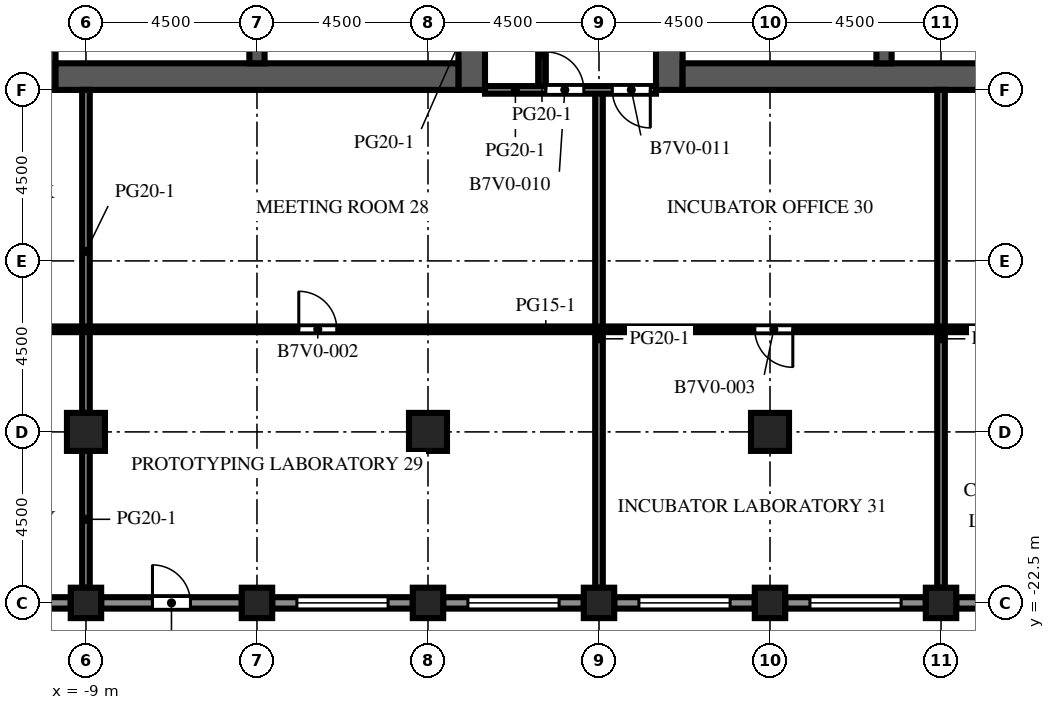
"""IFC4 building model, lengths in metres.
Left out: names, types, materials, properties, quantities, classifications, styles, units other than length and angle.
Written with IfcOpenShell. Run it as: python <this file> out.ifc"""

import sys

from ifc_helpers import new_model, si_unit, direction, frame, frame_2d, origin, origin_2d, place, context, subcontext, project, spatial, rectangle, extrude, element, fill, save


model = new_model("IFC4")
c1 = context("Model", 3, precision=1e-05, world=origin(), true_north=direction((0.0, 1.0)))
c2 = subcontext(c1, "Body", "Model", "MODEL_VIEW")
j1 = project(units=[si_unit("LENGTHUNIT", "METRE"), si_unit("PLANEANGLEUNIT", "RADIAN")], contexts=[c1])
p1 = place(None, origin())
s1 = spatial("IfcSite", under=j1, at=p1, CompositionType="ELEMENT")
p2 = place(p1, origin())
s2 = spatial("IfcBuilding", under=s1, at=p2, CompositionType="ELEMENT")
p3 = place(p2, frame((0.0, 0.0, 239.8)))
s3 = spatial("IfcBuildingStorey", under=s2, at=p3, CompositionType="ELEMENT", Elevation=239.8)
for number, where, z_axis, x_axis in (
    (1, (-9.0, -22.5, 0.0), (0.0, 0.0, 1.0), (1.0, 0.0, 0.0)),
    (2, (-4.5, -22.5, 0.0), (0.0, 0.0, 1.0), (1.0, 0.0, 0.0)),
    (3, (0.0, -22.5, 0.0), (0.0, 0.0, 1.0), (1.0, 0.0, 0.0)),
    (4, (4.5, -22.5, 0.0), (0.0, 0.0, 1.0), (1.0, 0.0, 0.0)),
    (5, (9.0, -22.5, 0.0), (0.0, 0.0, 1.0), (1.0, 0.0, 0.0)),
    (6, (13.5, -22.5, 0.0), (0.0, 0.0, 1.0), (1.0, 0.0, 0.0)),
):
    element("IfcColumn", number, at=place(p3, frame(where, z_axis=z_axis, x_axis=x_axis)), inside=s3, PredefinedType="COLUMN", context=c2, shape_type="SweptSolid", body=[
        extrude(rectangle(XDim=0.8, YDim=0.8, at=origin_2d()), origin(), (0.0, 0.0, 1.0), 4.1),
    ])
for number, where, z_axis, x_axis in (
    (7, (-9.0, -18.0, 0.0), (0.0, 0.0, 1.0), (1.0, 0.0, 0.0)),
    (8, (0.0, -18.0, 0.0), (0.0, 0.0, 1.0), (1.0, 0.0, 0.0)),
    (9, (9.0, -18.0, 0.0), (0.0, 0.0, 1.0), (1.0, 0.0, 0.0)),
):
    element("IfcColumn", number, at=place(p3, frame(where, z_axis=z_axis, x_axis=x_axis)), inside=s3, PredefinedType="COLUMN", context=c2, shape_type="SweptSolid", body=[
        extrude(rectangle(XDim=1.0, YDim=1.0, at=origin_2d()), origin(), (0.0, 0.0, 1.0), 4.1),
    ])
p4 = place(p3, frame((-10.15, -9.0, 0.0), z_axis=(0.0, 0.0, 1.0), x_axis=(0.0, 1.0, 0.0)))
e10 = element("IfcWall", 10, at=p4, inside=s3, PredefinedType="SHEAR", context=c2, shape_type="SweptSolid", body=[
    extrude(rectangle(XDim=27.5, YDim=0.7, at=frame_2d((13.75, 0.0))), origin(), (0.0, 0.0, 1.0), 4.1),
])
p5 = place(p4, frame((12.55, 0.0, 0.0)))
e11 = element("IfcOpeningElement", 11, at=p5, cuts=e10, PredefinedType="OPENING", context=c2, shape_type="SweptSolid", body=[
    extrude(rectangle(XDim=2.4, YDim=2.4, at=frame_2d((1.2, 1.2))), frame((0.0, 0.36, 0.0), z_axis=(0.0, -1.0, 0.0), x_axis=(1.0, 0.0, 0.0)), (0.0, 0.0, 1.0), 0.72),
])
p6 = place(p4, frame((6.825, 0.0, 0.0)))
e12 = element("IfcOpeningElement", 12, at=p6, cuts=e10, PredefinedType="OPENING", context=c2, shape_type="SweptSolid", body=[
    extrude(rectangle(XDim=1.2, YDim=2.1, at=frame_2d((0.6, 1.05))), frame((0.0, 0.36, 0.0), z_axis=(0.0, -1.0, 0.0), x_axis=(1.0, 0.0, 0.0)), (0.0, 0.0, 1.0), 0.72),
])
p7 = place(p4, frame((19.475, 0.0, 0.0)))
e13 = element("IfcOpeningElement", 13, at=p7, cuts=e10, PredefinedType="OPENING", context=c2, shape_type="SweptSolid", body=[
    extrude(rectangle(XDim=1.2, YDim=2.1, at=frame_2d((0.6, 1.05))), frame((0.0, 0.36, 0.0), z_axis=(0.0, -1.0, 0.0), x_axis=(1.0, 0.0, 0.0)), (0.0, 0.0, 1.0), 0.72),
])
p8 = place(p3, frame((1.15, -9.0, 0.0), z_axis=(0.0, 0.0, 1.0), x_axis=(0.0, 1.0, 0.0)))
e14 = element("IfcWall", 14, at=p8, inside=s3, PredefinedType="SHEAR", context=c2, shape_type="SweptSolid", body=[
    extrude(rectangle(XDim=27.5, YDim=0.7, at=frame_2d((13.75, 0.0))), origin(), (0.0, 0.0, 1.0), 4.1),
])
p9 = place(p8, frame((12.55, 0.0, 0.0)))
e15 = element("IfcOpeningElement", 15, at=p9, cuts=e14, PredefinedType="OPENING", context=c2, shape_type="SweptSolid", body=[
    extrude(rectangle(XDim=2.4, YDim=2.4, at=frame_2d((1.2, 1.2))), frame((0.0, 0.36, 0.0), z_axis=(0.0, -1.0, 0.0), x_axis=(1.0, 0.0, 0.0)), (0.0, 0.0, 1.0), 0.72),
])
p10 = place(p8, frame((5.42, 0.0, 0.0)))
e16 = element("IfcOpeningElement", 16, at=p10, cuts=e14, PredefinedType="OPENING", context=c2, shape_type="SweptSolid", body=[
    extrude(rectangle(XDim=1.2, YDim=2.1, at=frame_2d((0.6, 1.05))), frame((0.0, 0.36, 0.0), z_axis=(0.0, -1.0, 0.0), x_axis=(1.0, 0.0, 0.0)), (0.0, 0.0, 1.0), 0.72),
])
p11 = place(p8, frame((19.46, 0.0, 0.0)))
e17 = element("IfcOpeningElement", 17, at=p11, cuts=e14, PredefinedType="OPENING", context=c2, shape_type="SweptSolid", body=[
    extrude(rectangle(XDim=1.0, YDim=2.1, at=frame_2d((0.5, 1.05))), frame((0.0, 0.36, 0.0), z_axis=(0.0, -1.0, 0.0), x_axis=(1.0, 0.0, 0.0)), (0.0, 0.0, 1.0), 0.72),
])
p12 = place(p8, frame((21.17, 0.0, 0.0)))
e18 = element("IfcOpeningElement", 18, at=p12, cuts=e14, PredefinedType="OPENING", context=c2, shape_type="SweptSolid", body=[
    extrude(rectangle(XDim=1.0, YDim=2.1, at=frame_2d((0.5, 1.05))), frame((0.0, 0.36, 0.0), z_axis=(0.0, -1.0, 0.0), x_axis=(1.0, 0.0, 0.0)), (0.0, 0.0, 1.0), 0.72),
])
p13 = place(p8, frame((23.26, 0.0, 0.0)))
e19 = element("IfcOpeningElement", 19, at=p13, cuts=e14, PredefinedType="OPENING", context=c2, shape_type="SweptSolid", body=[
    extrude(rectangle(XDim=1.0, YDim=2.1, at=frame_2d((0.5, 1.05))), frame((0.0, 0.36, 0.0), z_axis=(0.0, -1.0, 0.0), x_axis=(1.0, 0.0, 0.0)), (0.0, 0.0, 1.0), 0.72),
])
p14 = place(p8, frame((25.35, 0.0, 0.0)))
e20 = element("IfcOpeningElement", 20, at=p14, cuts=e14, PredefinedType="OPENING", context=c2, shape_type="SweptSolid", body=[
    extrude(rectangle(XDim=1.0, YDim=2.1, at=frame_2d((0.5, 1.05))), frame((0.0, 0.36, 0.0), z_axis=(0.0, -1.0, 0.0), x_axis=(1.0, 0.0, 0.0)), (0.0, 0.0, 1.0), 0.72),
])
p15 = place(p3, frame((-9.8, -8.65, 0.0), z_axis=(0.0, 0.0, 1.0), x_axis=(1.0, 0.0, 0.0)))
e21 = element("IfcWall", 21, at=p15, inside=s3, PredefinedType="SHEAR", context=c2, shape_type="SweptSolid", body=[
    extrude(rectangle(XDim=10.6, YDim=0.7, at=frame_2d((5.3, 0.0))), origin(), (0.0, 0.0, 1.0), 4.1),
])
p16 = place(p3, frame((-4.5, -8.3, 0.0), z_axis=(0.0, 0.0, 1.0), x_axis=(0.0, 1.0, 0.0)))
e22 = element("IfcWall", 22, at=p16, inside=s3, PredefinedType="SHEAR", context=c2, shape_type="SweptSolid", body=[
    extrude(rectangle(XDim=7.6, YDim=0.4, at=frame_2d((3.8, 0.0))), origin(), (0.0, 0.0, 1.0), 4.1),
])
p17 = place(p3, frame((6.35, -9.0, 0.0), z_axis=(0.0, 0.0, 1.0), x_axis=(0.0, 1.0, 0.0)))
e23 = element("IfcWall", 23, at=p17, inside=s3, PredefinedType="SHEAR", context=c2, shape_type="SweptSolid", body=[
    extrude(rectangle(XDim=27.5, YDim=0.7, at=frame_2d((13.75, 0.0))), origin(), (0.0, 0.0, 1.0), 4.1),
])
p18 = place(p17, frame((12.55, 0.0, 0.0)))
e24 = element("IfcOpeningElement", 24, at=p18, cuts=e23, PredefinedType="OPENING", context=c2, shape_type="SweptSolid", body=[
    extrude(rectangle(XDim=2.4, YDim=2.4, at=frame_2d((1.2, 1.2))), frame((0.0, 0.36, 0.0), z_axis=(0.0, -1.0, 0.0), x_axis=(1.0, 0.0, 0.0)), (0.0, 0.0, 1.0), 0.72),
])
p19 = place(p17, frame((5.42, 0.0, 0.0)))
e25 = element("IfcOpeningElement", 25, at=p19, cuts=e23, PredefinedType="OPENING", context=c2, shape_type="SweptSolid", body=[
    extrude(rectangle(XDim=1.2, YDim=2.1, at=frame_2d((0.6, 1.05))), frame((0.0, 0.36, 0.0), z_axis=(0.0, -1.0, 0.0), x_axis=(1.0, 0.0, 0.0)), (0.0, 0.0, 1.0), 0.72),
])
p20 = place(p17, frame((19.46, 0.0, 0.0)))
e26 = element("IfcOpeningElement", 26, at=p20, cuts=e23, PredefinedType="OPENING", context=c2, shape_type="SweptSolid", body=[
    extrude(rectangle(XDim=1.0, YDim=2.1, at=frame_2d((0.5, 1.05))), frame((0.0, 0.36, 0.0), z_axis=(0.0, -1.0, 0.0), x_axis=(1.0, 0.0, 0.0)), (0.0, 0.0, 1.0), 0.72),
])
p21 = place(p17, frame((21.17, 0.0, 0.0)))
e27 = element("IfcOpeningElement", 27, at=p21, cuts=e23, PredefinedType="OPENING", context=c2, shape_type="SweptSolid", body=[
    extrude(rectangle(XDim=1.0, YDim=2.1, at=frame_2d((0.5, 1.05))), frame((0.0, 0.36, 0.0), z_axis=(0.0, -1.0, 0.0), x_axis=(1.0, 0.0, 0.0)), (0.0, 0.0, 1.0), 0.72),
])
p22 = place(p17, frame((23.26, 0.0, 0.0)))
e28 = element("IfcOpeningElement", 28, at=p22, cuts=e23, PredefinedType="OPENING", context=c2, shape_type="SweptSolid", body=[
    extrude(rectangle(XDim=1.0, YDim=2.1, at=frame_2d((0.5, 1.05))), frame((0.0, 0.36, 0.0), z_axis=(0.0, -1.0, 0.0), x_axis=(1.0, 0.0, 0.0)), (0.0, 0.0, 1.0), 0.72),
])
p23 = place(p17, frame((25.35, 0.0, 0.0)))
e29 = element("IfcOpeningElement", 29, at=p23, cuts=e23, PredefinedType="OPENING", context=c2, shape_type="SweptSolid", body=[
    extrude(rectangle(XDim=1.0, YDim=2.1, at=frame_2d((0.5, 1.05))), frame((0.0, 0.36, 0.0), z_axis=(0.0, -1.0, 0.0), x_axis=(1.0, 0.0, 0.0)), (0.0, 0.0, 1.0), 0.72),
])
p24 = place(p3, frame((6.7, -8.65, 0.0), z_axis=(0.0, 0.0, 1.0), x_axis=(1.0, 0.0, 0.0)))
e30 = element("IfcWall", 30, at=p24, inside=s3, PredefinedType="SHEAR", context=c2, shape_type="SweptSolid", body=[
    extrude(rectangle(XDim=10.6, YDim=0.7, at=frame_2d((5.3, 0.0))), origin(), (0.0, 0.0, 1.0), 4.1),
])
p25 = place(p3, frame((12.0, -8.3, 0.0), z_axis=(0.0, 0.0, 1.0), x_axis=(0.0, 1.0, 0.0)))
e31 = element("IfcWall", 31, at=p25, inside=s3, PredefinedType="SHEAR", context=c2, shape_type="SweptSolid", body=[
    extrude(rectangle(XDim=7.6, YDim=0.4, at=frame_2d((3.8, 0.0))), origin(), (0.0, 0.0, 1.0), 4.1),
])
p26 = place(p3, frame((-9.4, -22.5, 0.0), z_axis=(0.0, 0.0, 1.0), x_axis=(-1.0, 0.0, 0.0)))
e32 = element("IfcWall", 32, at=p26, inside=s3, PredefinedType="SOLIDWALL", context=c2, shape_type="SweptSolid", body=[
    extrude(rectangle(XDim=3.7, YDim=0.3, at=frame_2d((1.85, 0.0))), origin(), (0.0, 0.0, 1.0), 2.85),
])
p27 = place(p26, frame((0.65, 0.0, 0.8)))
e33 = element("IfcOpeningElement", 33, at=p27, cuts=e32, PredefinedType="OPENING", context=c2, shape_type="SweptSolid", body=[
    extrude(rectangle(XDim=2.4, YDim=1.7, at=frame_2d((1.2, 0.85))), frame((0.0, 0.16, 0.0), z_axis=(0.0, -1.0, 0.0), x_axis=(1.0, 0.0, 0.0)), (0.0, 0.0, 1.0), 0.32),
])
p28 = place(p3, frame((-4.9, -22.5, 0.0), z_axis=(0.0, 0.0, 1.0), x_axis=(-1.0, 0.0, 0.0)))
e34 = element("IfcWall", 34, at=p28, inside=s3, PredefinedType="SOLIDWALL", context=c2, shape_type="SweptSolid", body=[
    extrude(rectangle(XDim=3.7, YDim=0.3, at=frame_2d((1.85, 0.0))), origin(), (0.0, 0.0, 1.0), 2.85),
])
p29 = place(p28, frame((1.35, 0.0, 0.0)))
e35 = element("IfcOpeningElement", 35, at=p29, cuts=e34, PredefinedType="OPENING", context=c2, shape_type="SweptSolid", body=[
    extrude(rectangle(XDim=1.0, YDim=2.2, at=frame_2d((0.5, 1.1))), frame((0.0, 0.16, 0.0), z_axis=(0.0, -1.0, 0.0), x_axis=(1.0, 0.0, 0.0)), (0.0, 0.0, 1.0), 0.32),
])
p30 = place(p3, frame((-0.4, -22.5, 0.0), z_axis=(0.0, 0.0, 1.0), x_axis=(-1.0, 0.0, 0.0)))
e36 = element("IfcWall", 36, at=p30, inside=s3, PredefinedType="SOLIDWALL", context=c2, shape_type="SweptSolid", body=[
    extrude(rectangle(XDim=3.7, YDim=0.3, at=frame_2d((1.85, 0.0))), origin(), (0.0, 0.0, 1.0), 2.85),
])
p31 = place(p30, frame((0.65, 0.0, 0.8)))
e37 = element("IfcOpeningElement", 37, at=p31, cuts=e36, PredefinedType="OPENING", context=c2, shape_type="SweptSolid", body=[
    extrude(rectangle(XDim=2.4, YDim=1.7, at=frame_2d((1.2, 0.85))), frame((0.0, 0.16, 0.0), z_axis=(0.0, -1.0, 0.0), x_axis=(1.0, 0.0, 0.0)), (0.0, 0.0, 1.0), 0.32),
])
p32 = place(p3, frame((4.1, -22.5, 0.0), z_axis=(0.0, 0.0, 1.0), x_axis=(-1.0, 0.0, 0.0)))
e38 = element("IfcWall", 38, at=p32, inside=s3, PredefinedType="SOLIDWALL", context=c2, shape_type="SweptSolid", body=[
    extrude(rectangle(XDim=3.7, YDim=0.3, at=frame_2d((1.85, 0.0))), origin(), (0.0, 0.0, 1.0), 2.85),
])
p33 = place(p32, frame((0.65, 0.0, 0.8)))
e39 = element("IfcOpeningElement", 39, at=p33, cuts=e38, PredefinedType="OPENING", context=c2, shape_type="SweptSolid", body=[
    extrude(rectangle(XDim=2.4, YDim=1.7, at=frame_2d((1.2, 0.85))), frame((0.0, 0.16, 0.0), z_axis=(0.0, -1.0, 0.0), x_axis=(1.0, 0.0, 0.0)), (0.0, 0.0, 1.0), 0.32),
])
p34 = place(p3, frame((8.6, -22.5, 0.0), z_axis=(0.0, 0.0, 1.0), x_axis=(-1.0, 0.0, 0.0)))
e40 = element("IfcWall", 40, at=p34, inside=s3, PredefinedType="SOLIDWALL", context=c2, shape_type="SweptSolid", body=[
    extrude(rectangle(XDim=3.7, YDim=0.3, at=frame_2d((1.85, 0.0))), origin(), (0.0, 0.0, 1.0), 2.85),
])
p35 = place(p34, frame((0.65, 0.0, 0.8)))
e41 = element("IfcOpeningElement", 41, at=p35, cuts=e40, PredefinedType="OPENING", context=c2, shape_type="SweptSolid", body=[
    extrude(rectangle(XDim=2.4, YDim=1.7, at=frame_2d((1.2, 0.85))), frame((0.0, 0.16, 0.0), z_axis=(0.0, -1.0, 0.0), x_axis=(1.0, 0.0, 0.0)), (0.0, 0.0, 1.0), 0.32),
])
p36 = place(p3, frame((13.1, -22.5, 0.0), z_axis=(0.0, 0.0, 1.0), x_axis=(-1.0, 0.0, 0.0)))
e42 = element("IfcWall", 42, at=p36, inside=s3, PredefinedType="SOLIDWALL", context=c2, shape_type="SweptSolid", body=[
    extrude(rectangle(XDim=3.7, YDim=0.3, at=frame_2d((1.85, 0.0))), origin(), (0.0, 0.0, 1.0), 2.85),
])
p37 = place(p36, frame((0.65, 0.0, 0.8)))
e43 = element("IfcOpeningElement", 43, at=p37, cuts=e42, PredefinedType="OPENING", context=c2, shape_type="SweptSolid", body=[
    extrude(rectangle(XDim=2.4, YDim=1.7, at=frame_2d((1.2, 0.85))), frame((0.0, 0.16, 0.0), z_axis=(0.0, -1.0, 0.0), x_axis=(1.0, 0.0, 0.0)), (0.0, 0.0, 1.0), 0.32),
])
p38 = place(p3, frame((17.6, -22.5, 0.0), z_axis=(0.0, 0.0, 1.0), x_axis=(-1.0, 0.0, 0.0)))
e44 = element("IfcWall", 44, at=p38, inside=s3, PredefinedType="SOLIDWALL", context=c2, shape_type="SweptSolid", body=[
    extrude(rectangle(XDim=3.7, YDim=0.3, at=frame_2d((1.85, 0.0))), origin(), (0.0, 0.0, 1.0), 2.85),
])
p39 = place(p38, frame((1.35, 0.0, 0.0)))
e45 = element("IfcOpeningElement", 45, at=p39, cuts=e44, PredefinedType="OPENING", context=c2, shape_type="SweptSolid", body=[
    extrude(rectangle(XDim=1.0, YDim=2.2, at=frame_2d((0.5, 1.1))), frame((0.0, 0.16, 0.0), z_axis=(0.0, -1.0, 0.0), x_axis=(1.0, 0.0, 0.0)), (0.0, 0.0, 1.0), 0.32),
])
p40 = place(p3, frame((-9.0, -22.1, 0.0), z_axis=(0.0, 0.0, 1.0), x_axis=(0.0, 1.0, 0.0)))
e46 = element("IfcWall", 46, at=p40, inside=s3, PredefinedType="PARTITIONING", context=c2, shape_type="SweptSolid", body=[
    extrude(rectangle(XDim=3.6, YDim=0.2, at=frame_2d((1.8, 0.0))), origin(), (0.0, 0.0, 1.0), 3.65),
])
p41 = place(p3, frame((-9.0, -17.5, 0.0), z_axis=(0.0, 0.0, 1.0), x_axis=(0.0, 1.0, 0.0)))
e47 = element("IfcWall", 47, at=p41, inside=s3, PredefinedType="PARTITIONING", context=c2, shape_type="SweptSolid", body=[
    extrude(rectangle(XDim=8.5, YDim=0.2, at=frame_2d((4.25, 0.0))), origin(), (0.0, 0.0, 1.0), 3.65),
])
p42 = place(p3, frame((3.0, -9.0, 0.0), z_axis=(0.0, 0.0, 1.0), x_axis=(0.0, 1.0, 0.0)))
e48 = element("IfcWall", 48, at=p42, inside=s3, PredefinedType="PARTITIONING", context=c2, shape_type="SweptSolid", body=[
    extrude(rectangle(XDim=4.5, YDim=0.2, at=frame_2d((2.25, 0.0))), origin(), (0.0, 0.0, 1.0), 3.65),
])
p43 = place(p42, frame((1.85, 0.0, 0.0)))
e49 = element("IfcOpeningElement", 49, at=p43, cuts=e48, PredefinedType="OPENING", context=c2, shape_type="SweptSolid", body=[
    extrude(rectangle(XDim=1.0, YDim=2.1, at=frame_2d((0.5, 1.05))), frame((0.0, 0.11, 0.0), z_axis=(0.0, -1.0, 0.0), x_axis=(1.0, 0.0, 0.0)), (0.0, 0.0, 1.0), 0.22),
])
for number, where, z_axis, x_axis in (
    (50, (4.5, -22.1, 0.0), (0.0, 0.0, 1.0), (0.0, 1.0, 0.0)),
    (51, (13.5, -22.1, 0.0), (0.0, 0.0, 1.0), (0.0, 1.0, 0.0)),
):
    element("IfcWall", number, at=place(p3, frame(where, z_axis=z_axis, x_axis=x_axis)), inside=s3, PredefinedType="PARTITIONING", context=c2, shape_type="SweptSolid", body=[
        extrude(rectangle(XDim=13.1, YDim=0.2, at=frame_2d((6.55, 0.0))), origin(), (0.0, 0.0, 1.0), 3.65),
    ])
p44 = place(p3, frame((21.0, -15.3, 0.0), z_axis=(0.0, 0.0, 1.0), x_axis=(-1.0, 0.0, 0.0)))
e52 = element("IfcWall", 52, at=p44, inside=s3, PredefinedType="PARTITIONING", context=c2, shape_type="SweptSolid", body=[
    extrude(rectangle(XDim=34.5, YDim=0.15, at=frame_2d((17.25, 0.0))), origin(), (0.0, 0.0, 1.0), 3.65),
])
p45 = place(p44, frame((32.4, 0.0, 0.0)))
e53 = element("IfcOpeningElement", 53, at=p45, cuts=e52, PredefinedType="OPENING", context=c2, shape_type="SweptSolid", body=[
    extrude(rectangle(XDim=1.0, YDim=2.1, at=frame_2d((0.5, 1.05))), frame((0.0, 0.085, 0.0), z_axis=(0.0, -1.0, 0.0), x_axis=(1.0, 0.0, 0.0)), (0.0, 0.0, 1.0), 0.17),
])
p46 = place(p44, frame((23.4, 0.0, 0.0)))
e54 = element("IfcOpeningElement", 54, at=p46, cuts=e52, PredefinedType="OPENING", context=c2, shape_type="SweptSolid", body=[
    extrude(rectangle(XDim=1.0, YDim=2.1, at=frame_2d((0.5, 1.05))), frame((0.0, 0.085, 0.0), z_axis=(0.0, -1.0, 0.0), x_axis=(1.0, 0.0, 0.0)), (0.0, 0.0, 1.0), 0.17),
])
p47 = place(p44, frame((11.4, 0.0, 0.0)))
e55 = element("IfcOpeningElement", 55, at=p47, cuts=e52, PredefinedType="OPENING", context=c2, shape_type="SweptSolid", body=[
    extrude(rectangle(XDim=1.0, YDim=2.1, at=frame_2d((0.5, 1.05))), frame((0.0, 0.085, 0.0), z_axis=(0.0, -1.0, 0.0), x_axis=(1.0, 0.0, 0.0)), (0.0, 0.0, 1.0), 0.17),
])
p48 = place(p44, frame((2.4, 0.0, 0.0)))
e56 = element("IfcOpeningElement", 56, at=p48, cuts=e52, PredefinedType="OPENING", context=c2, shape_type="SweptSolid", body=[
    extrude(rectangle(XDim=1.0, YDim=2.1, at=frame_2d((0.5, 1.05))), frame((0.0, 0.085, 0.0), z_axis=(0.0, -1.0, 0.0), x_axis=(1.0, 0.0, 0.0)), (0.0, 0.0, 1.0), 0.17),
])
p49 = place(p3, frame((6.0, -9.0, 0.0), z_axis=(0.0, 0.0, 1.0), x_axis=(-1.0, 0.0, 0.0)))
e57 = element("IfcWall", 57, at=p49, inside=s3, PredefinedType="PARTITIONING", context=c2, shape_type="SweptSolid", body=[
    extrude(rectangle(XDim=4.5, YDim=0.2, at=frame_2d((2.25, 0.0))), origin(), (0.0, 0.0, 1.0), 3.65),
])
p50 = place(p49, frame((1.9, 0.0, 0.0)))
e58 = element("IfcOpeningElement", 58, at=p50, cuts=e57, PredefinedType="OPENING", context=c2, shape_type="SweptSolid", body=[
    extrude(rectangle(XDim=1.0, YDim=2.1, at=frame_2d((0.5, 1.05))), frame((0.0, 0.11, 0.0), z_axis=(0.0, -1.0, 0.0), x_axis=(1.0, 0.0, 0.0)), (0.0, 0.0, 1.0), 0.22),
])
p51 = place(p49, frame((0.15, 0.0, 0.0)))
e59 = element("IfcOpeningElement", 59, at=p51, cuts=e57, PredefinedType="OPENING", context=c2, shape_type="SweptSolid", body=[
    extrude(rectangle(XDim=1.0, YDim=2.1, at=frame_2d((0.5, 1.05))), frame((0.0, 0.11, 0.0), z_axis=(0.0, -1.0, 0.0), x_axis=(1.0, 0.0, 0.0)), (0.0, 0.0, 1.0), 0.22),
])
p52 = place(p29, origin())
e60 = element("IfcDoor", 60, at=p52, inside=s3, OperationType="SINGLE_SWING_RIGHT", PredefinedType="DOOR", context=c2, shape_type="SweptSolid", body=[
    extrude(rectangle(XDim=1.0, YDim=2.2, at=frame_2d((0.5, 1.1))), frame((0.0, 0.025, 0.0), z_axis=(0.0, -1.0, 0.0), x_axis=(1.0, 0.0, 0.0)), (0.0, 0.0, 1.0), 0.05),
])
fill(e35, e60)
p53 = place(p31, origin())
e61 = element("IfcWindow", 61, at=p53, inside=s3, PartitioningType="SINGLE_PANEL", PredefinedType="WINDOW", context=c2, shape_type="SweptSolid", body=[
    extrude(rectangle(XDim=2.4, YDim=1.7, at=frame_2d((1.2, 0.85))), frame((0.0, 0.03, 0.0), z_axis=(0.0, -1.0, 0.0), x_axis=(1.0, 0.0, 0.0)), (0.0, 0.0, 1.0), 0.06),
])
fill(e37, e61)
p54 = place(p33, origin())
e62 = element("IfcWindow", 62, at=p54, inside=s3, PartitioningType="SINGLE_PANEL", PredefinedType="WINDOW", context=c2, shape_type="SweptSolid", body=[
    extrude(rectangle(XDim=2.4, YDim=1.7, at=frame_2d((1.2, 0.85))), frame((0.0, 0.03, 0.0), z_axis=(0.0, -1.0, 0.0), x_axis=(1.0, 0.0, 0.0)), (0.0, 0.0, 1.0), 0.06),
])
fill(e39, e62)
p55 = place(p35, origin())
e63 = element("IfcWindow", 63, at=p55, inside=s3, PartitioningType="SINGLE_PANEL", PredefinedType="WINDOW", context=c2, shape_type="SweptSolid", body=[
    extrude(rectangle(XDim=2.4, YDim=1.7, at=frame_2d((1.2, 0.85))), frame((0.0, 0.03, 0.0), z_axis=(0.0, -1.0, 0.0), x_axis=(1.0, 0.0, 0.0)), (0.0, 0.0, 1.0), 0.06),
])
fill(e41, e63)
p56 = place(p37, origin())
e64 = element("IfcWindow", 64, at=p56, inside=s3, PartitioningType="SINGLE_PANEL", PredefinedType="WINDOW", context=c2, shape_type="SweptSolid", body=[
    extrude(rectangle(XDim=2.4, YDim=1.7, at=frame_2d((1.2, 0.85))), frame((0.0, 0.03, 0.0), z_axis=(0.0, -1.0, 0.0), x_axis=(1.0, 0.0, 0.0)), (0.0, 0.0, 1.0), 0.06),
])
fill(e43, e64)
p57 = place(p46, origin())
e65 = element("IfcDoor", 65, at=p57, inside=s3, OperationType="SINGLE_SWING_RIGHT", PredefinedType="DOOR", context=c2, shape_type="SweptSolid", body=[
    extrude(rectangle(XDim=1.0, YDim=2.1, at=frame_2d((0.5, 1.05))), frame((0.0, 0.025, 0.0), z_axis=(0.0, -1.0, 0.0), x_axis=(1.0, 0.0, 0.0)), (0.0, 0.0, 1.0), 0.05),
])
fill(e54, e65)
p58 = place(p47, origin())
e66 = element("IfcDoor", 66, at=p58, inside=s3, OperationType="SINGLE_SWING_LEFT", PredefinedType="DOOR", context=c2, shape_type="SweptSolid", body=[
    extrude(rectangle(XDim=1.0, YDim=2.1, at=frame_2d((0.5, 1.05))), frame((0.0, 0.025, 0.0), z_axis=(0.0, -1.0, 0.0), x_axis=(1.0, 0.0, 0.0)), (0.0, 0.0, 1.0), 0.05),
])
fill(e55, e66)
p59 = place(p50, origin())
e67 = element("IfcDoor", 67, at=p59, inside=s3, OperationType="SINGLE_SWING_RIGHT", PredefinedType="DOOR", context=c2, shape_type="SweptSolid", body=[
    extrude(rectangle(XDim=1.0, YDim=2.1, at=frame_2d((0.5, 1.05))), frame((0.0, 0.025, 0.0), z_axis=(0.0, -1.0, 0.0), x_axis=(1.0, 0.0, 0.0)), (0.0, 0.0, 1.0), 0.05),
])
fill(e58, e67)
p60 = place(p51, origin())
e68 = element("IfcDoor", 68, at=p60, inside=s3, OperationType="SINGLE_SWING_LEFT", PredefinedType="DOOR", context=c2, shape_type="SweptSolid", body=[
    extrude(rectangle(XDim=1.0, YDim=2.1, at=frame_2d((0.5, 1.05))), frame((0.0, 0.025, 0.0), z_axis=(0.0, -1.0, 0.0), x_axis=(1.0, 0.0, 0.0)), (0.0, 0.0, 1.0), 0.05),
])
fill(e59, e68)
save(model, sys.argv[1])
